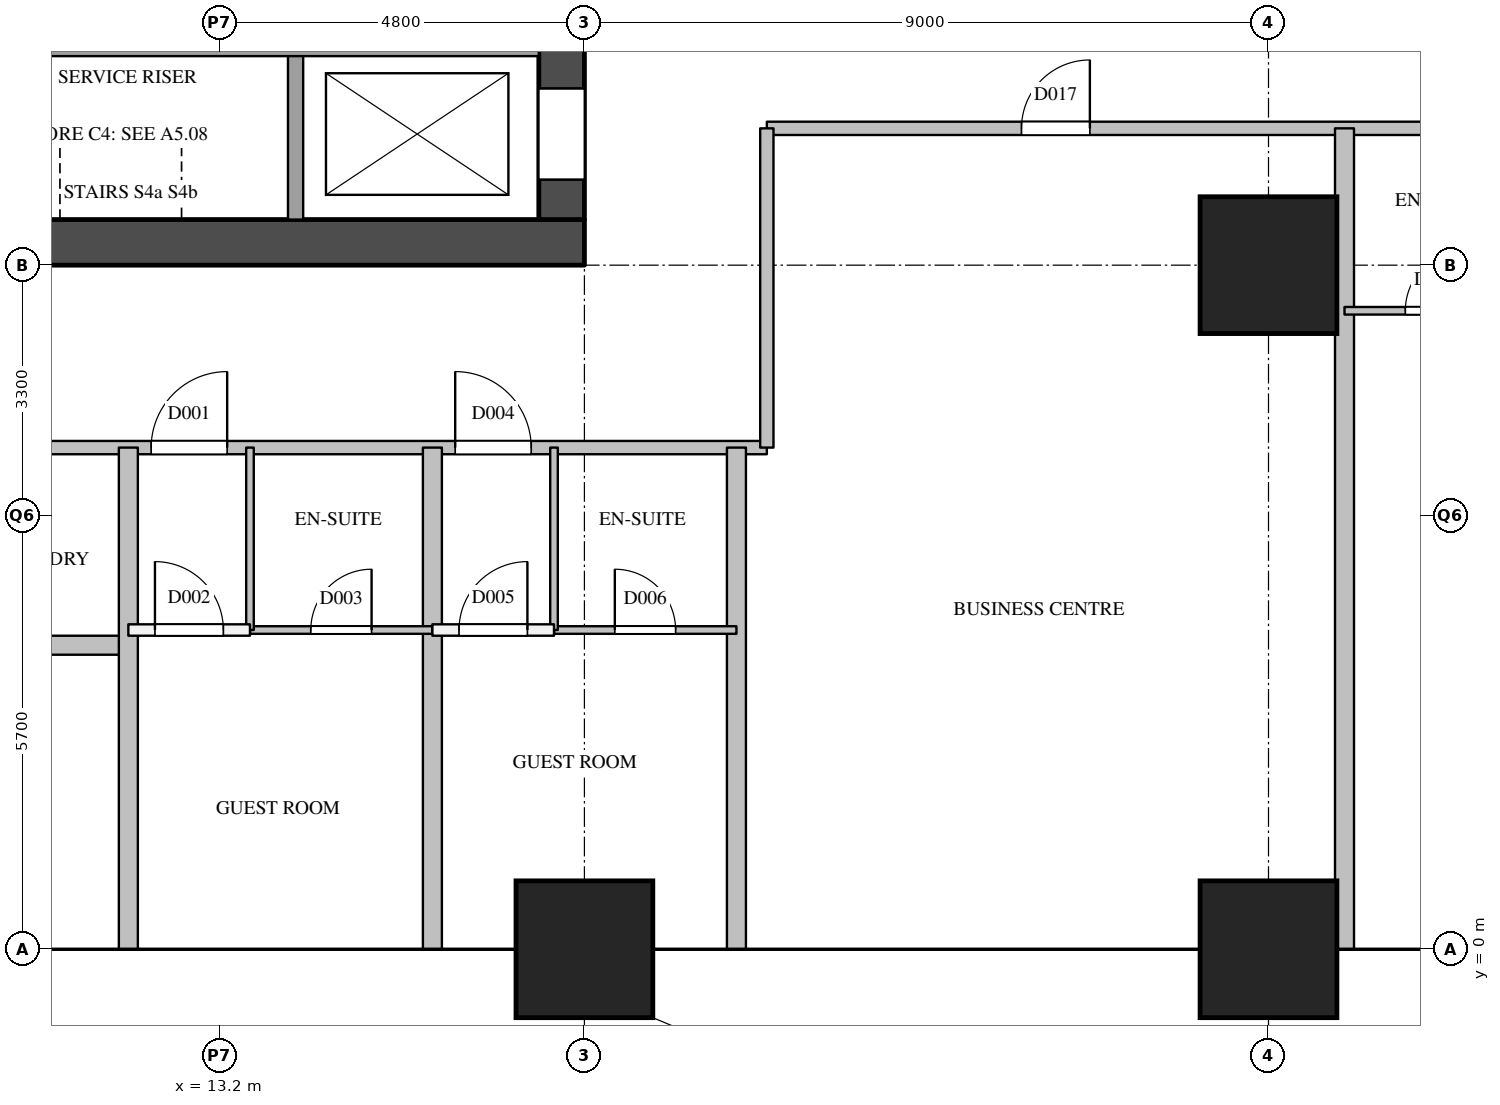
"""IFC4 building model, lengths in metres.
Left out: names, types, materials, properties, quantities, classifications, styles, units other than length and angle.
Written with IfcOpenShell. Run it as: python <this file> out.ifc"""

import sys

from ifc_helpers import new_model, si_unit, direction, frame, frame_2d, origin, origin_2d, place, context, subcontext, project, spatial, rectangle, extrude, element, fill, save


model = new_model("IFC4")
c1 = context("Model", 3, precision=1e-05, world=origin(), true_north=direction((0.0, 1.0)))
c2 = subcontext(c1, "Body", "Model", "MODEL_VIEW")
j1 = project(units=[si_unit("LENGTHUNIT", "METRE"), si_unit("PLANEANGLEUNIT", "RADIAN")], contexts=[c1])
p1 = place(None, origin())
s1 = spatial("IfcSite", under=j1, at=p1, CompositionType="ELEMENT")
p2 = place(p1, origin())
s2 = spatial("IfcBuilding", under=s1, at=p2, CompositionType="ELEMENT")
p3 = place(p2, frame((0.0, 0.0, 38.6)))
s3 = spatial("IfcBuildingStorey", under=s2, at=p3, CompositionType="ELEMENT", Elevation=38.6)
for number, where, z_axis, x_axis in (
    (1, (18.0, 0.0, 0.0), (0.0, 0.0, 1.0), (1.0, 0.0, 0.0)),
    (2, (27.0, 0.0, 0.0), (0.0, 0.0, 1.0), (1.0, 0.0, 0.0)),
    (3, (27.0, 9.0, 0.0), (0.0, 0.0, 1.0), (1.0, 0.0, 0.0)),
):
    element("IfcColumn", number, at=place(p3, frame(where, z_axis=z_axis, x_axis=x_axis)), inside=s3, PredefinedType="COLUMN", context=c2, shape_type="SweptSolid", body=[
        extrude(rectangle(XDim=1.8, YDim=1.8, at=origin_2d()), origin(), (0.0, 0.0, 1.0), 3.8),
    ])
p4 = place(p3, frame((9.0, 9.3, 0.0), z_axis=(0.0, 0.0, 1.0), x_axis=(1.0, 0.0, 0.0)))
e4 = element("IfcWall", 4, at=p4, inside=s3, PredefinedType="SHEAR", context=c2, shape_type="SweptSolid", body=[
    extrude(rectangle(XDim=9.0, YDim=0.6, at=frame_2d((4.5, 0.0))), origin(), (0.0, 0.0, 1.0), 3.5),
])
p5 = place(p3, frame((17.7, 9.6, 0.0), z_axis=(0.0, 0.0, 1.0), x_axis=(0.0, 1.0, 0.0)))
e5 = element("IfcWall", 5, at=p5, inside=s3, PredefinedType="SHEAR", context=c2, shape_type="SweptSolid", body=[
    extrude(rectangle(XDim=12.3, YDim=0.6, at=frame_2d((6.15, 0.0))), origin(), (0.0, 0.0, 1.0), 3.5),
])
p6 = place(p5, frame((0.525, 0.0, 0.0)))
e6 = element("IfcOpeningElement", 6, at=p6, cuts=e5, PredefinedType="OPENING", context=c2, shape_type="SweptSolid", body=[
    extrude(rectangle(XDim=1.2, YDim=2.1, at=frame_2d((0.6, 1.05))), frame((0.0, 0.31, 0.0), z_axis=(0.0, -1.0, 0.0), x_axis=(1.0, 0.0, 0.0)), (0.0, 0.0, 1.0), 0.62),
])
p7 = place(p3, frame((14.2, 9.6, 0.0), z_axis=(0.0, 0.0, 1.0), x_axis=(0.0, 1.0, 0.0)))
e7 = element("IfcWall", 7, at=p7, inside=s3, PredefinedType="SOLIDWALL", context=c2, shape_type="SweptSolid", body=[
    extrude(rectangle(XDim=2.3, YDim=0.2, at=frame_2d((1.15, 0.0))), origin(), (0.0, 0.0, 1.0), 3.5),
])
p8 = place(p3, frame((9.6, 11.85, 0.0), z_axis=(0.0, 0.0, 1.0), x_axis=(1.0, 0.0, 0.0)))
e8 = element("IfcWall", 8, at=p8, inside=s3, PredefinedType="SOLIDWALL", context=c2, shape_type="SweptSolid", body=[
    extrude(rectangle(XDim=7.8, YDim=0.2, at=frame_2d((3.9, 0.0))), origin(), (0.0, 0.0, 1.0), 3.5),
])
p9 = place(p3, frame((6.6, 6.6, 0.0), z_axis=(0.0, 0.0, 1.0), x_axis=(1.0, 0.0, 0.0)))
e9 = element("IfcWall", 9, at=p9, inside=s3, PredefinedType="PARTITIONING", context=c2, shape_type="SweptSolid", body=[
    extrude(rectangle(XDim=13.8, YDim=0.175, at=frame_2d((6.9, 0.0))), origin(), (0.0, 0.0, 1.0), 3.5),
])
p10 = place(p9, frame((5.7, 0.0, 0.0)))
e10 = element("IfcOpeningElement", 10, at=p10, cuts=e9, PredefinedType="OPENING", context=c2, shape_type="SweptSolid", body=[
    extrude(rectangle(XDim=1.0, YDim=2.1, at=frame_2d((0.5, 1.05))), frame((0.0, 0.097, 0.0), z_axis=(0.0, -1.0, 0.0), x_axis=(1.0, 0.0, 0.0)), (0.0, 0.0, 1.0), 0.195),
])
p11 = place(p9, frame((9.7, 0.0, 0.0)))
e11 = element("IfcOpeningElement", 11, at=p11, cuts=e9, PredefinedType="OPENING", context=c2, shape_type="SweptSolid", body=[
    extrude(rectangle(XDim=1.0, YDim=2.1, at=frame_2d((0.5, 1.05))), frame((0.0, 0.097, 0.0), z_axis=(0.0, -1.0, 0.0), x_axis=(1.0, 0.0, 0.0)), (0.0, 0.0, 1.0), 0.195),
])
p12 = place(p9, frame((2.9, 0.0, 0.0)))
e12 = element("IfcOpeningElement", 12, at=p12, cuts=e9, PredefinedType="OPENING", context=c2, shape_type="SweptSolid", body=[
    extrude(rectangle(XDim=1.0, YDim=2.1, at=frame_2d((0.5, 1.05))), frame((0.0, 0.097, 0.0), z_axis=(0.0, -1.0, 0.0), x_axis=(1.0, 0.0, 0.0)), (0.0, 0.0, 1.0), 0.195),
])
p13 = place(p3, frame((20.4, 10.8, 0.0), z_axis=(0.0, 0.0, 1.0), x_axis=(1.0, 0.0, 0.0)))
e13 = element("IfcWall", 13, at=p13, inside=s3, PredefinedType="PARTITIONING", context=c2, shape_type="SweptSolid", body=[
    extrude(rectangle(XDim=13.2, YDim=0.175, at=frame_2d((6.6, 0.0))), origin(), (0.0, 0.0, 1.0), 2.5),
])
p14 = place(p13, frame((11.1, 0.0, 0.0)))
e14 = element("IfcOpeningElement", 14, at=p14, cuts=e13, PredefinedType="OPENING", context=c2, shape_type="SweptSolid", body=[
    extrude(rectangle(XDim=1.0, YDim=2.1, at=frame_2d((0.5, 1.05))), frame((0.0, 0.097, 0.0), z_axis=(0.0, -1.0, 0.0), x_axis=(1.0, 0.0, 0.0)), (0.0, 0.0, 1.0), 0.195),
])
p15 = place(p13, frame((3.35, 0.0, 0.0)))
e15 = element("IfcOpeningElement", 15, at=p15, cuts=e13, PredefinedType="OPENING", context=c2, shape_type="SweptSolid", body=[
    extrude(rectangle(XDim=0.9, YDim=2.1, at=frame_2d((0.45, 1.05))), frame((0.0, 0.097, 0.0), z_axis=(0.0, -1.0, 0.0), x_axis=(1.0, 0.0, 0.0)), (0.0, 0.0, 1.0), 0.195),
])
p16 = place(p3, frame((20.4, 6.6, 0.0), z_axis=(0.0, 0.0, 1.0), x_axis=(0.0, 1.0, 0.0)))
e16 = element("IfcWall", 16, at=p16, inside=s3, PredefinedType="PARTITIONING", context=c2, shape_type="SweptSolid", body=[
    extrude(rectangle(XDim=4.2, YDim=0.175, at=frame_2d((2.1, 0.0))), origin(), (0.0, 0.0, 1.0), 3.5),
])
p17 = place(p3, frame((12.0, 4.2, 0.0), z_axis=(0.0, 0.0, 1.0), x_axis=(1.0, 0.0, 0.0)))
e17 = element("IfcWall", 17, at=p17, inside=s3, PredefinedType="PARTITIONING", context=c2, shape_type="SweptSolid", body=[
    extrude(rectangle(XDim=1.6, YDim=0.15, at=frame_2d((0.8, 0.0))), origin(), (0.0, 0.0, 1.0), 3.5),
])
p18 = place(p17, frame((0.35, 0.0, 0.0)))
e18 = element("IfcOpeningElement", 18, at=p18, cuts=e17, PredefinedType="OPENING", context=c2, shape_type="SweptSolid", body=[
    extrude(rectangle(XDim=0.9, YDim=2.1, at=frame_2d((0.45, 1.05))), frame((0.0, 0.085, 0.0), z_axis=(0.0, -1.0, 0.0), x_axis=(1.0, 0.0, 0.0)), (0.0, 0.0, 1.0), 0.17),
])
p19 = place(p3, frame((16.0, 4.2, 0.0), z_axis=(0.0, 0.0, 1.0), x_axis=(1.0, 0.0, 0.0)))
e19 = element("IfcWall", 19, at=p19, inside=s3, PredefinedType="PARTITIONING", context=c2, shape_type="SweptSolid", body=[
    extrude(rectangle(XDim=1.6, YDim=0.15, at=frame_2d((0.8, 0.0))), origin(), (0.0, 0.0, 1.0), 3.5),
])
p20 = place(p19, frame((0.35, 0.0, 0.0)))
e20 = element("IfcOpeningElement", 20, at=p20, cuts=e19, PredefinedType="OPENING", context=c2, shape_type="SweptSolid", body=[
    extrude(rectangle(XDim=0.9, YDim=2.1, at=frame_2d((0.45, 1.05))), frame((0.0, 0.085, 0.0), z_axis=(0.0, -1.0, 0.0), x_axis=(1.0, 0.0, 0.0)), (0.0, 0.0, 1.0), 0.17),
])
p21 = place(p3, frame((7.875, 4.0, 0.0), z_axis=(0.0, 0.0, 1.0), x_axis=(1.0, 0.0, 0.0)))
e21 = element("IfcWall", 21, at=p21, inside=s3, PredefinedType="PARTITIONING", context=c2, shape_type="SweptSolid", body=[
    extrude(rectangle(XDim=4.125, YDim=0.25, at=frame_2d((2.062, 0.0))), origin(), (0.0, 0.0, 1.0), 3.5),
])
for number, where, z_axis, x_axis in (
    (22, (12.0, 0.0, 0.0), (0.0, 0.0, 1.0), (0.0, 1.0, 0.0)),
    (23, (16.0, 0.0, 0.0), (0.0, 0.0, 1.0), (0.0, 1.0, 0.0)),
    (24, (20.0, 0.0, 0.0), (0.0, 0.0, 1.0), (0.0, 1.0, 0.0)),
):
    element("IfcWall", number, at=place(p3, frame(where, z_axis=z_axis, x_axis=x_axis)), inside=s3, PredefinedType="PARTITIONING", context=c2, shape_type="SweptSolid", body=[
        extrude(rectangle(XDim=6.6, YDim=0.25, at=frame_2d((3.3, 0.0))), origin(), (0.0, 0.0, 1.0), 2.5),
    ])
p22 = place(p3, frame((28.0, 0.0, 0.0), z_axis=(0.0, 0.0, 1.0), x_axis=(0.0, 1.0, 0.0)))
e25 = element("IfcWall", 25, at=p22, inside=s3, PredefinedType="PARTITIONING", context=c2, shape_type="SweptSolid", body=[
    extrude(rectangle(XDim=10.8, YDim=0.25, at=frame_2d((5.4, 0.0))), origin(), (0.0, 0.0, 1.0), 2.5),
])
p23 = place(p3, frame((13.6, 4.2, 0.0), z_axis=(0.0, 0.0, 1.0), x_axis=(1.0, 0.0, 0.0)))
e26 = element("IfcWall", 26, at=p23, inside=s3, PredefinedType="PARTITIONING", context=c2, shape_type="SweptSolid", body=[
    extrude(rectangle(XDim=2.4, YDim=0.1, at=frame_2d((1.2, 0.0))), origin(), (0.0, 0.0, 1.0), 3.5),
])
p24 = place(p23, frame((0.8, 0.0, 0.0)))
e27 = element("IfcOpeningElement", 27, at=p24, cuts=e26, PredefinedType="OPENING", context=c2, shape_type="SweptSolid", body=[
    extrude(rectangle(XDim=0.8, YDim=2.1, at=frame_2d((0.4, 1.05))), frame((0.0, 0.06, 0.0), z_axis=(0.0, -1.0, 0.0), x_axis=(1.0, 0.0, 0.0)), (0.0, 0.0, 1.0), 0.12),
])
p25 = place(p3, frame((17.6, 4.2, 0.0), z_axis=(0.0, 0.0, 1.0), x_axis=(1.0, 0.0, 0.0)))
e28 = element("IfcWall", 28, at=p25, inside=s3, PredefinedType="PARTITIONING", context=c2, shape_type="SweptSolid", body=[
    extrude(rectangle(XDim=2.4, YDim=0.1, at=frame_2d((1.2, 0.0))), origin(), (0.0, 0.0, 1.0), 3.5),
])
p26 = place(p25, frame((0.8, 0.0, 0.0)))
e29 = element("IfcOpeningElement", 29, at=p26, cuts=e28, PredefinedType="OPENING", context=c2, shape_type="SweptSolid", body=[
    extrude(rectangle(XDim=0.8, YDim=2.1, at=frame_2d((0.4, 1.05))), frame((0.0, 0.06, 0.0), z_axis=(0.0, -1.0, 0.0), x_axis=(1.0, 0.0, 0.0)), (0.0, 0.0, 1.0), 0.12),
])
p27 = place(p3, frame((28.0, 8.4, 0.0), z_axis=(0.0, 0.0, 1.0), x_axis=(1.0, 0.0, 0.0)))
e30 = element("IfcWall", 30, at=p27, inside=s3, PredefinedType="PARTITIONING", context=c2, shape_type="SweptSolid", body=[
    extrude(rectangle(XDim=2.4, YDim=0.1, at=frame_2d((1.2, 0.0))), origin(), (0.0, 0.0, 1.0), 3.5),
])
p28 = place(p27, frame((0.8, 0.0, 0.0)))
e31 = element("IfcOpeningElement", 31, at=p28, cuts=e30, PredefinedType="OPENING", context=c2, shape_type="SweptSolid", body=[
    extrude(rectangle(XDim=0.8, YDim=2.1, at=frame_2d((0.4, 1.05))), frame((0.0, 0.06, 0.0), z_axis=(0.0, -1.0, 0.0), x_axis=(1.0, 0.0, 0.0)), (0.0, 0.0, 1.0), 0.12),
])
for number, where, z_axis, x_axis in (
    (32, (13.6, 4.2, 0.0), (0.0, 0.0, 1.0), (0.0, 1.0, 0.0)),
    (33, (17.6, 4.2, 0.0), (0.0, 0.0, 1.0), (0.0, 1.0, 0.0)),
):
    element("IfcWall", number, at=place(p3, frame(where, z_axis=z_axis, x_axis=x_axis)), inside=s3, PredefinedType="PARTITIONING", context=c2, shape_type="SweptSolid", body=[
        extrude(rectangle(XDim=2.4, YDim=0.1, at=frame_2d((1.2, 0.0))), origin(), (0.0, 0.0, 1.0), 3.5),
    ])
p29 = place(p6, origin())
e34 = element("IfcDoor", 34, at=p29, inside=s3, OperationType="SLIDING_TO_LEFT", PredefinedType="DOOR", context=c2, shape_type="SweptSolid", body=[
    extrude(rectangle(XDim=1.2, YDim=2.1, at=frame_2d((0.6, 1.05))), frame((0.0, 0.025, 0.0), z_axis=(0.0, -1.0, 0.0), x_axis=(1.0, 0.0, 0.0)), (0.0, 0.0, 1.0), 0.05),
])
fill(e6, e34)
p30 = place(p10, origin())
e35 = element("IfcDoor", 35, at=p30, inside=s3, OperationType="SINGLE_SWING_RIGHT", PredefinedType="DOOR", context=c2, shape_type="SweptSolid", body=[
    extrude(rectangle(XDim=1.0, YDim=2.1, at=frame_2d((0.5, 1.05))), frame((0.0, 0.025, 0.0), z_axis=(0.0, -1.0, 0.0), x_axis=(1.0, 0.0, 0.0)), (0.0, 0.0, 1.0), 0.05),
])
fill(e10, e35)
p31 = place(p18, origin())
e36 = element("IfcDoor", 36, at=p31, inside=s3, OperationType="SINGLE_SWING_LEFT", PredefinedType="DOOR", context=c2, shape_type="SweptSolid", body=[
    extrude(rectangle(XDim=0.9, YDim=2.1, at=frame_2d((0.45, 1.05))), frame((0.0, 0.025, 0.0), z_axis=(0.0, -1.0, 0.0), x_axis=(1.0, 0.0, 0.0)), (0.0, 0.0, 1.0), 0.05),
])
fill(e18, e36)
p32 = place(p24, origin())
e37 = element("IfcDoor", 37, at=p32, inside=s3, OperationType="SINGLE_SWING_RIGHT", PredefinedType="DOOR", context=c2, shape_type="SweptSolid", body=[
    extrude(rectangle(XDim=0.8, YDim=2.1, at=frame_2d((0.4, 1.05))), frame((0.0, 0.025, 0.0), z_axis=(0.0, -1.0, 0.0), x_axis=(1.0, 0.0, 0.0)), (0.0, 0.0, 1.0), 0.05),
])
fill(e27, e37)
p33 = place(p11, origin())
e38 = element("IfcDoor", 38, at=p33, inside=s3, OperationType="SINGLE_SWING_LEFT", PredefinedType="DOOR", context=c2, shape_type="SweptSolid", body=[
    extrude(rectangle(XDim=1.0, YDim=2.1, at=frame_2d((0.5, 1.05))), frame((0.0, 0.025, 0.0), z_axis=(0.0, -1.0, 0.0), x_axis=(1.0, 0.0, 0.0)), (0.0, 0.0, 1.0), 0.05),
])
fill(e11, e38)
p34 = place(p20, origin())
e39 = element("IfcDoor", 39, at=p34, inside=s3, OperationType="SINGLE_SWING_RIGHT", PredefinedType="DOOR", context=c2, shape_type="SweptSolid", body=[
    extrude(rectangle(XDim=0.9, YDim=2.1, at=frame_2d((0.45, 1.05))), frame((0.0, 0.025, 0.0), z_axis=(0.0, -1.0, 0.0), x_axis=(1.0, 0.0, 0.0)), (0.0, 0.0, 1.0), 0.05),
])
fill(e20, e39)
p35 = place(p26, origin())
e40 = element("IfcDoor", 40, at=p35, inside=s3, OperationType="SINGLE_SWING_LEFT", PredefinedType="DOOR", context=c2, shape_type="SweptSolid", body=[
    extrude(rectangle(XDim=0.8, YDim=2.1, at=frame_2d((0.4, 1.05))), frame((0.0, 0.025, 0.0), z_axis=(0.0, -1.0, 0.0), x_axis=(1.0, 0.0, 0.0)), (0.0, 0.0, 1.0), 0.05),
])
fill(e29, e40)
p36 = place(p28, origin())
e41 = element("IfcDoor", 41, at=p36, inside=s3, OperationType="SINGLE_SWING_RIGHT", PredefinedType="DOOR", context=c2, shape_type="SweptSolid", body=[
    extrude(rectangle(XDim=0.8, YDim=2.1, at=frame_2d((0.4, 1.05))), frame((0.0, 0.025, 0.0), z_axis=(0.0, -1.0, 0.0), x_axis=(1.0, 0.0, 0.0)), (0.0, 0.0, 1.0), 0.05),
])
fill(e31, e41)
p37 = place(p15, origin())
e42 = element("IfcDoor", 42, at=p37, inside=s3, OperationType="SINGLE_SWING_RIGHT", PredefinedType="DOOR", context=c2, shape_type="SweptSolid", body=[
    extrude(rectangle(XDim=0.9, YDim=2.1, at=frame_2d((0.45, 1.05))), frame((0.0, 0.025, 0.0), z_axis=(0.0, -1.0, 0.0), x_axis=(1.0, 0.0, 0.0)), (0.0, 0.0, 1.0), 0.05),
])
fill(e15, e42)
save(model, sys.argv[1])
